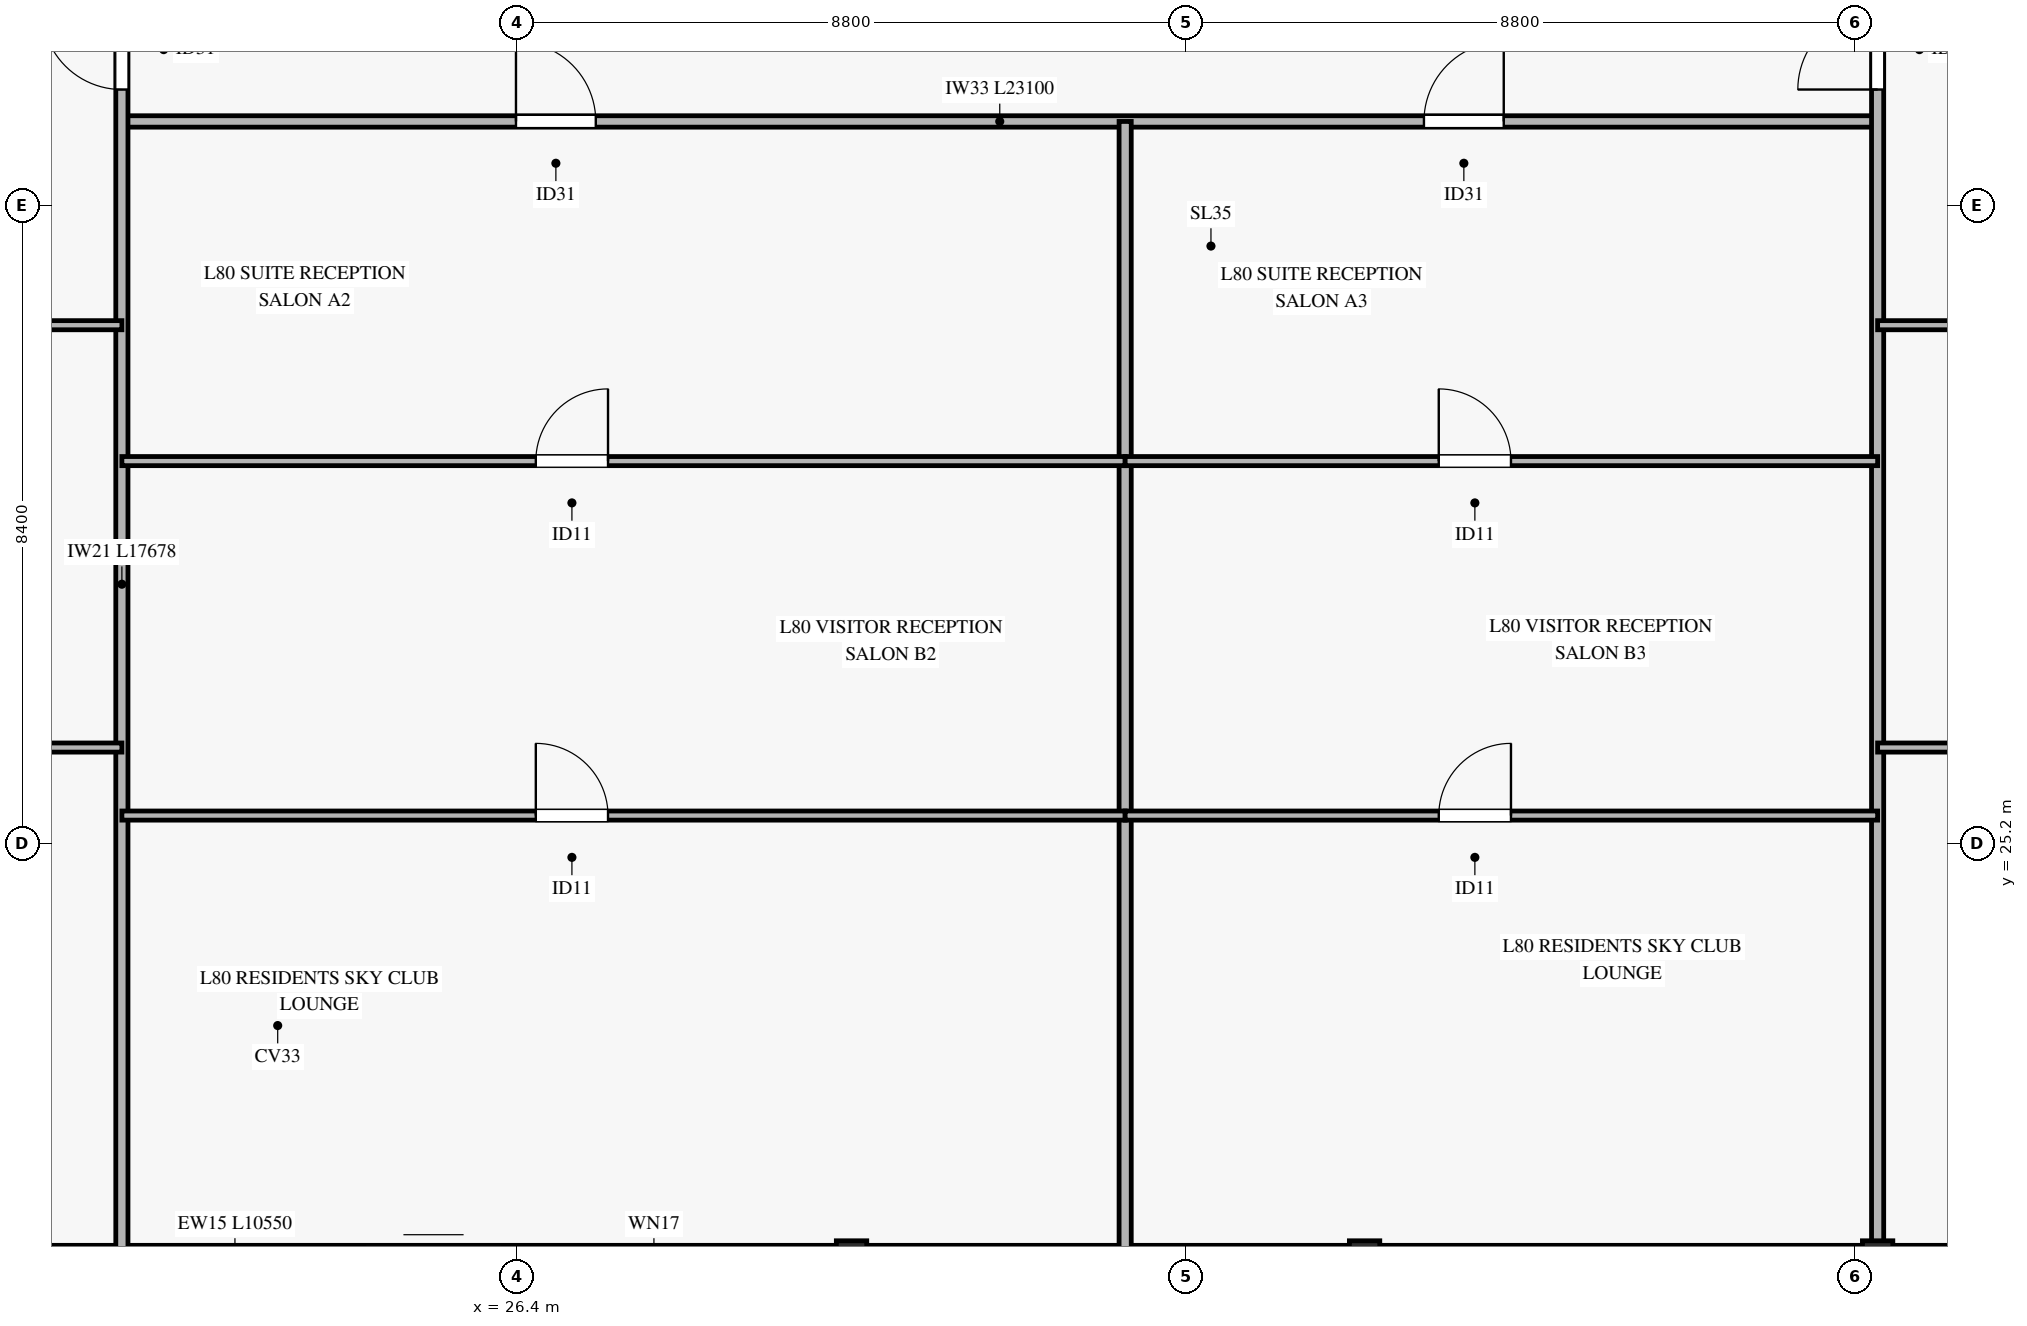
"""IFC4 building model, lengths in metres.
Left out: names, types, materials, properties, quantities, classifications, styles, units other than length and angle.
Written with IfcOpenShell. Run it as: python <this file> out.ifc"""

import sys

from ifc_helpers import new_model, si_unit, direction, frame, frame_2d, origin, origin_2d, place, context, subcontext, project, spatial, rectangle, hollow_rectangle, extrude, source, transform, mapped, element, fill, save


model = new_model("IFC4")
c1 = context("Model", 3, precision=1e-05, world=origin(), true_north=direction((0.0, 1.0)))
c2 = subcontext(c1, "Body", "Model", "MODEL_VIEW")
j1 = project(units=[si_unit("LENGTHUNIT", "METRE"), si_unit("PLANEANGLEUNIT", "RADIAN")], contexts=[c1])
p1 = place(None, origin())
s1 = spatial("IfcSite", under=j1, at=p1, CompositionType="ELEMENT")
p2 = place(p1, origin())
s2 = spatial("IfcBuilding", under=s1, at=p2, CompositionType="ELEMENT")
p3 = place(p2, frame((0.0, 0.0, 310.8)))
s3 = spatial("IfcBuildingStorey", under=s2, at=p3, CompositionType="ELEMENT", Elevation=310.8)
m1 = source(origin(), c2, "Body", "SweptSolid", [
    extrude(hollow_rectangle(XDim=0.4, YDim=0.4, WallThickness=0.02, at=origin_2d()), origin(), (0.0, 0.0, 1.0), 3.319),
])
for number, where, z_axis, x_axis in (
    (1, (30.8, 19.772, 0.0), (0.0, 0.281, 0.96), (-1.0, 0.0, 0.0)),
    (2, (37.55, 19.772, 0.0), (0.0, 0.281, 0.96), (-1.0, 0.0, 0.0)),
    (3, (44.3, 19.772, 0.0), (0.0, 0.281, 0.96), (-1.0, 0.0, 0.0)),
):
    element("IfcColumn", number, at=place(p3, frame(where, z_axis=z_axis, x_axis=x_axis)), inside=s3, PredefinedType="COLUMN", context=c2, shape_type="MappedRepresentation", body=[
        mapped(m1, transform((0.0, 0.0, 0.0), x_axis=(1.0, 0.0, 0.0), y_axis=(0.0, 1.0, 0.0), z_axis=(0.0, 0.0, 1.0), scale=1.0)),
    ])
p4 = place(p3, frame((20.05, 19.772, 0.0), z_axis=(0.0, 0.0, 1.0), x_axis=(1.0, 0.0, 0.0)))
e4 = element("IfcWall", 4, at=p4, inside=s3, PredefinedType="SOLIDWALL", context=c2, shape_type="SweptSolid", body=[
    extrude(rectangle(XDim=10.55, YDim=0.28, at=frame_2d((5.275, 0.0))), origin(), (0.0, 0.0, 1.0), 2.815),
])
p5 = place(p4, frame((4.35, 0.0, 0.0)))
e5 = element("IfcOpeningElement", 5, at=p5, cuts=e4, PredefinedType="OPENING", context=c2, shape_type="SweptSolid", body=[
    extrude(rectangle(XDim=1.8, YDim=2.25, at=frame_2d((0.9, 1.125))), frame((0.0, 0.15, 0.0), z_axis=(0.0, -1.0, 0.0), x_axis=(1.0, 0.0, 0.0)), (0.0, 0.0, 1.0), 0.3),
])
p6 = place(p4, frame((1.57, 0.0, 0.45)))
e6 = element("IfcOpeningElement", 6, at=p6, cuts=e4, PredefinedType="OPENING", context=c2, shape_type="SweptSolid", body=[
    extrude(rectangle(XDim=2.2, YDim=2.1, at=frame_2d((1.1, 1.05))), frame((0.0, 0.15, 0.0), z_axis=(0.0, -1.0, 0.0), x_axis=(1.0, 0.0, 0.0)), (0.0, 0.0, 1.0), 0.3),
])
p7 = place(p4, frame((7.35, 0.0, 0.45)))
e7 = element("IfcOpeningElement", 7, at=p7, cuts=e4, PredefinedType="OPENING", context=c2, shape_type="SweptSolid", body=[
    extrude(rectangle(XDim=1.6, YDim=2.0, at=frame_2d((0.8, 1.0))), frame((0.0, 0.15, 0.0), z_axis=(0.0, -1.0, 0.0), x_axis=(1.0, 0.0, 0.0)), (0.0, 0.0, 1.0), 0.3),
])
for number, where, z_axis, x_axis in (
    (8, (31.0, 19.772, 0.0), (0.0, 0.0, 1.0), (1.0, 0.0, 0.0)),
    (9, (37.75, 19.772, 0.0), (0.0, 0.0, 1.0), (1.0, 0.0, 0.0)),
):
    element("IfcWall", number, at=place(p3, frame(where, z_axis=z_axis, x_axis=x_axis)), inside=s3, PredefinedType="SOLIDWALL", context=c2, shape_type="SweptSolid", body=[
        extrude(rectangle(XDim=6.35, YDim=0.28, at=frame_2d((3.175, 0.0))), origin(), (0.0, 0.0, 1.0), 2.815),
    ])
p8 = place(p3, frame((44.5, 19.772, 0.0), z_axis=(0.0, 0.0, 1.0), x_axis=(1.0, 0.0, 0.0)))
e10 = element("IfcWall", 10, at=p8, inside=s3, PredefinedType="SOLIDWALL", context=c2, shape_type="SweptSolid", body=[
    extrude(rectangle(XDim=5.85, YDim=0.28, at=frame_2d((2.925, 0.0))), origin(), (0.0, 0.0, 1.0), 2.815),
])
p9 = place(p8, frame((2.0, 0.0, 0.0)))
e11 = element("IfcOpeningElement", 11, at=p9, cuts=e10, PredefinedType="OPENING", context=c2, shape_type="SweptSolid", body=[
    extrude(rectangle(XDim=1.8, YDim=2.25, at=frame_2d((0.9, 1.125))), frame((0.0, 0.15, 0.0), z_axis=(0.0, -1.0, 0.0), x_axis=(1.0, 0.0, 0.0)), (0.0, 0.0, 1.0), 0.3),
])
p10 = place(p3, frame((21.2, 34.7, 0.0), z_axis=(0.0, 0.0, 1.0), x_axis=(1.0, 0.0, 0.0)))
e12 = element("IfcWall", 12, at=p10, inside=s3, PredefinedType="PARTITIONING", context=c2, shape_type="SweptSolid", body=[
    extrude(rectangle(XDim=23.1, YDim=0.15, at=frame_2d((11.55, 0.0))), origin(), (0.0, 0.0, 1.0), 2.47),
])
p11 = place(p10, frame((5.185, 0.0, 0.0)))
e13 = element("IfcOpeningElement", 13, at=p11, cuts=e12, PredefinedType="OPENING", context=c2, shape_type="SweptSolid", body=[
    extrude(rectangle(XDim=1.05, YDim=2.15, at=frame_2d((0.525, 1.075))), frame((0.0, 0.085, 0.0), z_axis=(0.0, -1.0, 0.0), x_axis=(1.0, 0.0, 0.0)), (0.0, 0.0, 1.0), 0.17),
])
p12 = place(p10, frame((17.131, 0.0, 0.0)))
e14 = element("IfcOpeningElement", 14, at=p12, cuts=e12, PredefinedType="OPENING", context=c2, shape_type="SweptSolid", body=[
    extrude(rectangle(XDim=1.05, YDim=2.15, at=frame_2d((0.525, 1.075))), frame((0.0, 0.085, 0.0), z_axis=(0.0, -1.0, 0.0), x_axis=(1.0, 0.0, 0.0)), (0.0, 0.0, 1.0), 0.17),
])
p13 = place(p3, frame((21.2, 19.772, 0.0), z_axis=(0.0, 0.0, 1.0), x_axis=(0.0, 1.0, 0.0)))
e15 = element("IfcWall", 15, at=p13, inside=s3, PredefinedType="PARTITIONING", context=c2, shape_type="SweptSolid", body=[
    extrude(rectangle(XDim=17.678, YDim=0.16, at=frame_2d((8.839, 0.0))), origin(), (0.0, 0.0, 1.0), 2.77),
])
p14 = place(p13, frame((15.348, 0.0, 0.0)))
e16 = element("IfcOpeningElement", 16, at=p14, cuts=e15, PredefinedType="OPENING", context=c2, shape_type="SweptSolid", body=[
    extrude(rectangle(XDim=1.05, YDim=2.15, at=frame_2d((0.525, 1.075))), frame((0.0, 0.09, 0.0), z_axis=(0.0, -1.0, 0.0), x_axis=(1.0, 0.0, 0.0)), (0.0, 0.0, 1.0), 0.18),
])
p15 = place(p3, frame((34.4, 19.772, 0.0), z_axis=(0.0, 0.0, 1.0), x_axis=(0.0, 1.0, 0.0)))
e17 = element("IfcWall", 17, at=p15, inside=s3, PredefinedType="PARTITIONING", context=c2, shape_type="SweptSolid", body=[
    extrude(rectangle(XDim=14.928, YDim=0.16, at=frame_2d((7.464, 0.0))), origin(), (0.0, 0.0, 1.0), 2.77),
])
p16 = place(p3, frame((44.3, 19.772, 0.0), z_axis=(0.0, 0.0, 1.0), x_axis=(0.0, 1.0, 0.0)))
e18 = element("IfcWall", 18, at=p16, inside=s3, PredefinedType="PARTITIONING", context=c2, shape_type="SweptSolid", body=[
    extrude(rectangle(XDim=17.678, YDim=0.16, at=frame_2d((8.839, 0.0))), origin(), (0.0, 0.0, 1.0), 2.47),
])
p17 = place(p16, frame((15.348, 0.0, 0.0)))
e19 = element("IfcOpeningElement", 19, at=p17, cuts=e18, PredefinedType="OPENING", context=c2, shape_type="SweptSolid", body=[
    extrude(rectangle(XDim=1.05, YDim=2.15, at=frame_2d((0.525, 1.075))), frame((0.0, 0.09, 0.0), z_axis=(0.0, -1.0, 0.0), x_axis=(1.0, 0.0, 0.0)), (0.0, 0.0, 1.0), 0.18),
])
p18 = place(p3, frame((10.44, 26.462, 0.0), z_axis=(0.0, 0.0, 1.0), x_axis=(1.0, 0.0, 0.0)))
e20 = element("IfcWall", 20, at=p18, inside=s3, PredefinedType="PARTITIONING", context=c2, shape_type="SweptSolid", body=[
    extrude(rectangle(XDim=10.76, YDim=0.12, at=frame_2d((5.38, 0.0))), origin(), (0.0, 0.0, 1.0), 2.47),
])
p19 = place(p18, frame((4.839, 0.0, 0.0)))
e21 = element("IfcOpeningElement", 21, at=p19, cuts=e20, PredefinedType="OPENING", context=c2, shape_type="SweptSolid", body=[
    extrude(rectangle(XDim=0.95, YDim=2.1, at=frame_2d((0.475, 1.05))), frame((0.0, 0.07, 0.0), z_axis=(0.0, -1.0, 0.0), x_axis=(1.0, 0.0, 0.0)), (0.0, 0.0, 1.0), 0.14),
])
p20 = place(p3, frame((10.44, 32.019, 0.0), z_axis=(0.0, 0.0, 1.0), x_axis=(1.0, 0.0, 0.0)))
e22 = element("IfcWall", 22, at=p20, inside=s3, PredefinedType="PARTITIONING", context=c2, shape_type="SweptSolid", body=[
    extrude(rectangle(XDim=10.76, YDim=0.12, at=frame_2d((5.38, 0.0))), origin(), (0.0, 0.0, 1.0), 2.47),
])
p21 = place(p20, frame((4.839, 0.0, 0.0)))
e23 = element("IfcOpeningElement", 23, at=p21, cuts=e22, PredefinedType="OPENING", context=c2, shape_type="SweptSolid", body=[
    extrude(rectangle(XDim=0.95, YDim=2.1, at=frame_2d((0.475, 1.05))), frame((0.0, 0.07, 0.0), z_axis=(0.0, -1.0, 0.0), x_axis=(1.0, 0.0, 0.0)), (0.0, 0.0, 1.0), 0.14),
])
p22 = place(p3, frame((21.2, 25.567, 0.0), z_axis=(0.0, 0.0, 1.0), x_axis=(1.0, 0.0, 0.0)))
e24 = element("IfcWall", 24, at=p22, inside=s3, PredefinedType="PARTITIONING", context=c2, shape_type="SweptSolid", body=[
    extrude(rectangle(XDim=13.2, YDim=0.12, at=frame_2d((6.6, 0.0))), origin(), (0.0, 0.0, 1.0), 2.47),
])
p23 = place(p22, frame((5.446, 0.0, 0.0)))
e25 = element("IfcOpeningElement", 25, at=p23, cuts=e24, PredefinedType="OPENING", context=c2, shape_type="SweptSolid", body=[
    extrude(rectangle(XDim=0.95, YDim=2.1, at=frame_2d((0.475, 1.05))), frame((0.0, 0.07, 0.0), z_axis=(0.0, -1.0, 0.0), x_axis=(1.0, 0.0, 0.0)), (0.0, 0.0, 1.0), 0.14),
])
p24 = place(p3, frame((21.2, 30.231, 0.0), z_axis=(0.0, 0.0, 1.0), x_axis=(1.0, 0.0, 0.0)))
e26 = element("IfcWall", 26, at=p24, inside=s3, PredefinedType="PARTITIONING", context=c2, shape_type="SweptSolid", body=[
    extrude(rectangle(XDim=13.2, YDim=0.12, at=frame_2d((6.6, 0.0))), origin(), (0.0, 0.0, 1.0), 2.47),
])
p25 = place(p24, frame((5.446, 0.0, 0.0)))
e27 = element("IfcOpeningElement", 27, at=p25, cuts=e26, PredefinedType="OPENING", context=c2, shape_type="SweptSolid", body=[
    extrude(rectangle(XDim=0.95, YDim=2.1, at=frame_2d((0.475, 1.05))), frame((0.0, 0.07, 0.0), z_axis=(0.0, -1.0, 0.0), x_axis=(1.0, 0.0, 0.0)), (0.0, 0.0, 1.0), 0.14),
])
p26 = place(p3, frame((34.4, 25.567, 0.0), z_axis=(0.0, 0.0, 1.0), x_axis=(1.0, 0.0, 0.0)))
e28 = element("IfcWall", 28, at=p26, inside=s3, PredefinedType="PARTITIONING", context=c2, shape_type="SweptSolid", body=[
    extrude(rectangle(XDim=9.9, YDim=0.12, at=frame_2d((4.95, 0.0))), origin(), (0.0, 0.0, 1.0), 2.47),
])
p27 = place(p26, frame((4.126, 0.0, 0.0)))
e29 = element("IfcOpeningElement", 29, at=p27, cuts=e28, PredefinedType="OPENING", context=c2, shape_type="SweptSolid", body=[
    extrude(rectangle(XDim=0.95, YDim=2.1, at=frame_2d((0.475, 1.05))), frame((0.0, 0.07, 0.0), z_axis=(0.0, -1.0, 0.0), x_axis=(1.0, 0.0, 0.0)), (0.0, 0.0, 1.0), 0.14),
])
p28 = place(p3, frame((34.4, 30.231, 0.0), z_axis=(0.0, 0.0, 1.0), x_axis=(1.0, 0.0, 0.0)))
e30 = element("IfcWall", 30, at=p28, inside=s3, PredefinedType="PARTITIONING", context=c2, shape_type="SweptSolid", body=[
    extrude(rectangle(XDim=9.9, YDim=0.12, at=frame_2d((4.95, 0.0))), origin(), (0.0, 0.0, 1.0), 2.47),
])
p29 = place(p28, frame((4.126, 0.0, 0.0)))
e31 = element("IfcOpeningElement", 31, at=p29, cuts=e30, PredefinedType="OPENING", context=c2, shape_type="SweptSolid", body=[
    extrude(rectangle(XDim=0.95, YDim=2.1, at=frame_2d((0.475, 1.05))), frame((0.0, 0.07, 0.0), z_axis=(0.0, -1.0, 0.0), x_axis=(1.0, 0.0, 0.0)), (0.0, 0.0, 1.0), 0.14),
])
p30 = place(p3, frame((44.3, 26.462, 0.0), z_axis=(0.0, 0.0, 1.0), x_axis=(1.0, 0.0, 0.0)))
e32 = element("IfcWall", 32, at=p30, inside=s3, PredefinedType="PARTITIONING", context=c2, shape_type="SweptSolid", body=[
    extrude(rectangle(XDim=15.66, YDim=0.12, at=frame_2d((7.83, 0.0))), origin(), (0.0, 0.0, 1.0), 2.47),
])
p31 = place(p30, frame((6.184, 0.0, 0.0)))
e33 = element("IfcOpeningElement", 33, at=p31, cuts=e32, PredefinedType="OPENING", context=c2, shape_type="SweptSolid", body=[
    extrude(rectangle(XDim=0.95, YDim=2.1, at=frame_2d((0.475, 1.05))), frame((0.0, 0.07, 0.0), z_axis=(0.0, -1.0, 0.0), x_axis=(1.0, 0.0, 0.0)), (0.0, 0.0, 1.0), 0.14),
])
p32 = place(p3, frame((44.3, 32.019, 0.0), z_axis=(0.0, 0.0, 1.0), x_axis=(1.0, 0.0, 0.0)))
e34 = element("IfcWall", 34, at=p32, inside=s3, PredefinedType="PARTITIONING", context=c2, shape_type="SweptSolid", body=[
    extrude(rectangle(XDim=15.66, YDim=0.12, at=frame_2d((7.83, 0.0))), origin(), (0.0, 0.0, 1.0), 2.47),
])
p33 = place(p32, frame((6.184, 0.0, 0.0)))
e35 = element("IfcOpeningElement", 35, at=p33, cuts=e34, PredefinedType="OPENING", context=c2, shape_type="SweptSolid", body=[
    extrude(rectangle(XDim=0.95, YDim=2.1, at=frame_2d((0.475, 1.05))), frame((0.0, 0.07, 0.0), z_axis=(0.0, -1.0, 0.0), x_axis=(1.0, 0.0, 0.0)), (0.0, 0.0, 1.0), 0.14),
])
m2 = source(origin(), c2, "Body", "SweptSolid", [
    extrude(rectangle(XDim=1.05, YDim=2.15, at=frame_2d((0.525, 1.075))), frame((0.0, 0.025, 0.0), z_axis=(0.0, -1.0, 0.0), x_axis=(1.0, 0.0, 0.0)), (0.0, 0.0, 1.0), 0.05),
])
p34 = place(p14, origin())
e36 = element("IfcDoor", 36, at=p34, inside=s3, OperationType="SINGLE_SWING_RIGHT", PredefinedType="DOOR", context=c2, shape_type="MappedRepresentation", body=[
    mapped(m2, transform((0.0, 0.0, 0.0), x_axis=(1.0, 0.0, 0.0), y_axis=(0.0, 1.0, 0.0), z_axis=(0.0, 0.0, 1.0), scale=1.0)),
])
fill(e16, e36)
p35 = place(p11, origin())
e37 = element("IfcDoor", 37, at=p35, inside=s3, OperationType="SINGLE_SWING_LEFT", PredefinedType="DOOR", context=c2, shape_type="MappedRepresentation", body=[
    mapped(m2, transform((0.0, 0.0, 0.0), x_axis=(1.0, 0.0, 0.0), y_axis=(0.0, 1.0, 0.0), z_axis=(0.0, 0.0, 1.0), scale=1.0)),
])
fill(e13, e37)
m3 = source(origin(), c2, "Body", "SweptSolid", [
    extrude(rectangle(XDim=0.95, YDim=2.1, at=frame_2d((0.475, 1.05))), frame((0.0, 0.025, 0.0), z_axis=(0.0, -1.0, 0.0), x_axis=(1.0, 0.0, 0.0)), (0.0, 0.0, 1.0), 0.05),
])
p36 = place(p25, origin())
e38 = element("IfcDoor", 38, at=p36, inside=s3, OperationType="SINGLE_SWING_RIGHT", PredefinedType="DOOR", context=c2, shape_type="MappedRepresentation", body=[
    mapped(m3, transform((0.0, 0.0, 0.0), x_axis=(1.0, 0.0, 0.0), y_axis=(0.0, 1.0, 0.0), z_axis=(0.0, 0.0, 1.0), scale=1.0)),
])
fill(e27, e38)
p37 = place(p23, origin())
e39 = element("IfcDoor", 39, at=p37, inside=s3, OperationType="SINGLE_SWING_LEFT", PredefinedType="DOOR", context=c2, shape_type="MappedRepresentation", body=[
    mapped(m3, transform((0.0, 0.0, 0.0), x_axis=(1.0, 0.0, 0.0), y_axis=(0.0, 1.0, 0.0), z_axis=(0.0, 0.0, 1.0), scale=1.0)),
])
fill(e25, e39)
p38 = place(p12, origin())
e40 = element("IfcDoor", 40, at=p38, inside=s3, OperationType="SINGLE_SWING_RIGHT", PredefinedType="DOOR", context=c2, shape_type="MappedRepresentation", body=[
    mapped(m2, transform((0.0, 0.0, 0.0), x_axis=(1.0, 0.0, 0.0), y_axis=(0.0, 1.0, 0.0), z_axis=(0.0, 0.0, 1.0), scale=1.0)),
])
fill(e14, e40)
p39 = place(p29, origin())
e41 = element("IfcDoor", 41, at=p39, inside=s3, OperationType="SINGLE_SWING_LEFT", PredefinedType="DOOR", context=c2, shape_type="MappedRepresentation", body=[
    mapped(m3, transform((0.0, 0.0, 0.0), x_axis=(1.0, 0.0, 0.0), y_axis=(0.0, 1.0, 0.0), z_axis=(0.0, 0.0, 1.0), scale=1.0)),
])
fill(e31, e41)
p40 = place(p27, origin())
e42 = element("IfcDoor", 42, at=p40, inside=s3, OperationType="SINGLE_SWING_RIGHT", PredefinedType="DOOR", context=c2, shape_type="MappedRepresentation", body=[
    mapped(m3, transform((0.0, 0.0, 0.0), x_axis=(1.0, 0.0, 0.0), y_axis=(0.0, 1.0, 0.0), z_axis=(0.0, 0.0, 1.0), scale=1.0)),
])
fill(e29, e42)
p41 = place(p17, origin())
e43 = element("IfcDoor", 43, at=p41, inside=s3, OperationType="SINGLE_SWING_LEFT", PredefinedType="DOOR", context=c2, shape_type="MappedRepresentation", body=[
    mapped(m2, transform((0.0, 0.0, 0.0), x_axis=(1.0, 0.0, 0.0), y_axis=(0.0, 1.0, 0.0), z_axis=(0.0, 0.0, 1.0), scale=1.0)),
])
fill(e19, e43)
save(model, sys.argv[1])
